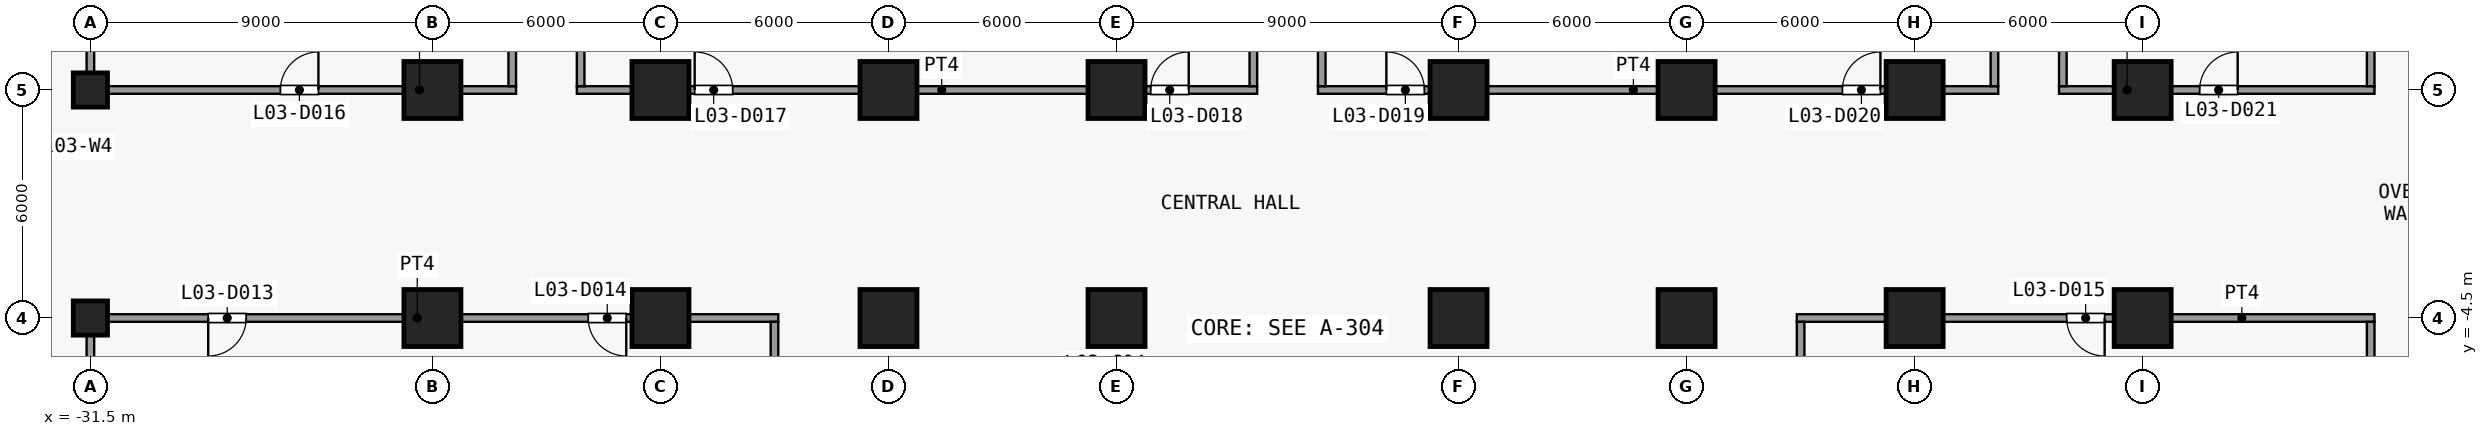
"""IFC4 building model, lengths in metres.
Left out: names, types, materials, properties, quantities, classifications, styles, units other than length and angle.
Written with IfcOpenShell. Run it as: python <this file> out.ifc"""

import sys

from ifc_helpers import new_model, si_unit, direction, frame, frame_2d, origin, origin_2d, place, context, subcontext, project, spatial, rectangle, extrude, element, fill, save


model = new_model("IFC4")
c1 = context("Model", 3, precision=1e-05, world=origin(), true_north=direction((0.0, 1.0)))
c2 = subcontext(c1, "Body", "Model", "MODEL_VIEW")
j1 = project(units=[si_unit("LENGTHUNIT", "METRE"), si_unit("PLANEANGLEUNIT", "RADIAN")], contexts=[c1])
p1 = place(None, origin())
s1 = spatial("IfcSite", under=j1, at=p1, CompositionType="ELEMENT")
p2 = place(p1, origin())
s2 = spatial("IfcBuilding", under=s1, at=p2, CompositionType="ELEMENT")
p3 = place(p2, frame((0.0, 0.0, 18.5)))
s3 = spatial("IfcBuildingStorey", under=s2, at=p3, CompositionType="ELEMENT", Elevation=18.5)
for number, where, z_axis, x_axis in (
    (1, (-31.5, -4.5, 0.0), (0.0, 0.0, 1.0), (1.0, 0.0, 0.0)),
    (2, (-31.5, 1.5, 0.0), (0.0, 0.0, 1.0), (1.0, 0.0, 0.0)),
):
    element("IfcColumn", number, at=place(p3, frame(where, z_axis=z_axis, x_axis=x_axis)), inside=s3, PredefinedType="COLUMN", context=c2, shape_type="SweptSolid", body=[
        extrude(rectangle(XDim=0.9, YDim=0.9, at=origin_2d()), origin(), (0.0, 0.0, 1.0), 5.0),
    ])
for number, where, z_axis, x_axis in (
    (3, (-22.5, -4.5, 0.0), (0.0, 0.0, 1.0), (1.0, 0.0, 0.0)),
    (4, (-22.5, 1.5, 0.0), (0.0, 0.0, 1.0), (1.0, 0.0, 0.0)),
    (5, (-16.5, -4.5, 0.0), (0.0, 0.0, 1.0), (1.0, 0.0, 0.0)),
    (6, (-16.5, 1.5, 0.0), (0.0, 0.0, 1.0), (1.0, 0.0, 0.0)),
    (7, (-10.5, -4.5, 0.0), (0.0, 0.0, 1.0), (1.0, 0.0, 0.0)),
    (8, (-10.5, 1.5, 0.0), (0.0, 0.0, 1.0), (1.0, 0.0, 0.0)),
    (9, (-4.5, -4.5, 0.0), (0.0, 0.0, 1.0), (1.0, 0.0, 0.0)),
    (10, (-4.5, 1.5, 0.0), (0.0, 0.0, 1.0), (1.0, 0.0, 0.0)),
    (11, (4.5, -4.5, 0.0), (0.0, 0.0, 1.0), (1.0, 0.0, 0.0)),
    (12, (4.5, 1.5, 0.0), (0.0, 0.0, 1.0), (1.0, 0.0, 0.0)),
    (13, (10.5, -4.5, 0.0), (0.0, 0.0, 1.0), (1.0, 0.0, 0.0)),
    (14, (10.5, 1.5, 0.0), (0.0, 0.0, 1.0), (1.0, 0.0, 0.0)),
    (15, (16.5, -4.5, 0.0), (0.0, 0.0, 1.0), (1.0, 0.0, 0.0)),
    (16, (16.5, 1.5, 0.0), (0.0, 0.0, 1.0), (1.0, 0.0, 0.0)),
    (17, (22.5, -4.5, 0.0), (0.0, 0.0, 1.0), (1.0, 0.0, 0.0)),
    (18, (22.5, 1.5, 0.0), (0.0, 0.0, 1.0), (1.0, 0.0, 0.0)),
):
    element("IfcColumn", number, at=place(p3, frame(where, z_axis=z_axis, x_axis=x_axis)), inside=s3, PredefinedType="COLUMN", context=c2, shape_type="SweptSolid", body=[
        extrude(rectangle(XDim=1.5, YDim=1.5, at=origin_2d()), origin(), (0.0, 0.0, 1.0), 5.0),
    ])
p4 = place(p3, frame((-31.6, -4.5, 0.0), z_axis=(0.0, 0.0, 1.0), x_axis=(1.0, 0.0, 0.0)))
e19 = element("IfcWall", 19, at=p4, inside=s3, PredefinedType="PARTITIONING", context=c2, shape_type="SweptSolid", body=[
    extrude(rectangle(XDim=18.2, YDim=0.2, at=frame_2d((9.1, 0.0))), origin(), (0.0, 0.0, 1.0), 4.65),
])
p5 = place(p4, frame((3.2, 0.0, 0.0)))
e20 = element("IfcOpeningElement", 20, at=p5, cuts=e19, PredefinedType="OPENING", context=c2, shape_type="SweptSolid", body=[
    extrude(rectangle(XDim=1.0, YDim=2.1, at=frame_2d((0.5, 1.05))), frame((0.0, 0.11, 0.0), z_axis=(0.0, -1.0, 0.0), x_axis=(1.0, 0.0, 0.0)), (0.0, 0.0, 1.0), 0.22),
])
p6 = place(p4, frame((13.2, 0.0, 0.0)))
e21 = element("IfcOpeningElement", 21, at=p6, cuts=e19, PredefinedType="OPENING", context=c2, shape_type="SweptSolid", body=[
    extrude(rectangle(XDim=1.0, YDim=2.1, at=frame_2d((0.5, 1.05))), frame((0.0, 0.11, 0.0), z_axis=(0.0, -1.0, 0.0), x_axis=(1.0, 0.0, 0.0)), (0.0, 0.0, 1.0), 0.22),
])
p7 = place(p3, frame((13.4, -4.5, 0.0), z_axis=(0.0, 0.0, 1.0), x_axis=(1.0, 0.0, 0.0)))
e22 = element("IfcWall", 22, at=p7, inside=s3, PredefinedType="PARTITIONING", context=c2, shape_type="SweptSolid", body=[
    extrude(rectangle(XDim=15.2, YDim=0.2, at=frame_2d((7.6, 0.0))), origin(), (0.0, 0.0, 1.0), 4.65),
])
p8 = place(p7, frame((7.1, 0.0, 0.0)))
e23 = element("IfcOpeningElement", 23, at=p8, cuts=e22, PredefinedType="OPENING", context=c2, shape_type="SweptSolid", body=[
    extrude(rectangle(XDim=1.0, YDim=2.1, at=frame_2d((0.5, 1.05))), frame((0.0, 0.11, 0.0), z_axis=(0.0, -1.0, 0.0), x_axis=(1.0, 0.0, 0.0)), (0.0, 0.0, 1.0), 0.22),
])
p9 = place(p3, frame((-31.6, 1.5, 0.0), z_axis=(0.0, 0.0, 1.0), x_axis=(1.0, 0.0, 0.0)))
e24 = element("IfcWall", 24, at=p9, inside=s3, PredefinedType="PARTITIONING", context=c2, shape_type="SweptSolid", body=[
    extrude(rectangle(XDim=11.3, YDim=0.2, at=frame_2d((5.65, 0.0))), origin(), (0.0, 0.0, 1.0), 4.65),
])
p10 = place(p9, frame((5.1, 0.0, 0.0)))
e25 = element("IfcOpeningElement", 25, at=p10, cuts=e24, PredefinedType="OPENING", context=c2, shape_type="SweptSolid", body=[
    extrude(rectangle(XDim=1.0, YDim=2.1, at=frame_2d((0.5, 1.05))), frame((0.0, 0.11, 0.0), z_axis=(0.0, -1.0, 0.0), x_axis=(1.0, 0.0, 0.0)), (0.0, 0.0, 1.0), 0.22),
])
p11 = place(p3, frame((-18.7, 1.5, 0.0), z_axis=(0.0, 0.0, 1.0), x_axis=(1.0, 0.0, 0.0)))
e26 = element("IfcWall", 26, at=p11, inside=s3, PredefinedType="PARTITIONING", context=c2, shape_type="SweptSolid", body=[
    extrude(rectangle(XDim=17.9, YDim=0.2, at=frame_2d((8.95, 0.0))), origin(), (0.0, 0.0, 1.0), 4.65),
])
p12 = place(p11, frame((3.1, 0.0, 0.0)))
e27 = element("IfcOpeningElement", 27, at=p12, cuts=e26, PredefinedType="OPENING", context=c2, shape_type="SweptSolid", body=[
    extrude(rectangle(XDim=1.0, YDim=2.1, at=frame_2d((0.5, 1.05))), frame((0.0, 0.11, 0.0), z_axis=(0.0, -1.0, 0.0), x_axis=(1.0, 0.0, 0.0)), (0.0, 0.0, 1.0), 0.22),
])
p13 = place(p11, frame((15.1, 0.0, 0.0)))
e28 = element("IfcOpeningElement", 28, at=p13, cuts=e26, PredefinedType="OPENING", context=c2, shape_type="SweptSolid", body=[
    extrude(rectangle(XDim=1.0, YDim=2.1, at=frame_2d((0.5, 1.05))), frame((0.0, 0.11, 0.0), z_axis=(0.0, -1.0, 0.0), x_axis=(1.0, 0.0, 0.0)), (0.0, 0.0, 1.0), 0.22),
])
p14 = place(p3, frame((0.8, 1.5, 0.0), z_axis=(0.0, 0.0, 1.0), x_axis=(1.0, 0.0, 0.0)))
e29 = element("IfcWall", 29, at=p14, inside=s3, PredefinedType="PARTITIONING", context=c2, shape_type="SweptSolid", body=[
    extrude(rectangle(XDim=17.9, YDim=0.2, at=frame_2d((8.95, 0.0))), origin(), (0.0, 0.0, 1.0), 4.65),
])
p15 = place(p14, frame((1.8, 0.0, 0.0)))
e30 = element("IfcOpeningElement", 30, at=p15, cuts=e29, PredefinedType="OPENING", context=c2, shape_type="SweptSolid", body=[
    extrude(rectangle(XDim=1.0, YDim=2.1, at=frame_2d((0.5, 1.05))), frame((0.0, 0.11, 0.0), z_axis=(0.0, -1.0, 0.0), x_axis=(1.0, 0.0, 0.0)), (0.0, 0.0, 1.0), 0.22),
])
p16 = place(p14, frame((13.8, 0.0, 0.0)))
e31 = element("IfcOpeningElement", 31, at=p16, cuts=e29, PredefinedType="OPENING", context=c2, shape_type="SweptSolid", body=[
    extrude(rectangle(XDim=1.0, YDim=2.1, at=frame_2d((0.5, 1.05))), frame((0.0, 0.11, 0.0), z_axis=(0.0, -1.0, 0.0), x_axis=(1.0, 0.0, 0.0)), (0.0, 0.0, 1.0), 0.22),
])
p17 = place(p3, frame((20.3, 1.5, 0.0), z_axis=(0.0, 0.0, 1.0), x_axis=(1.0, 0.0, 0.0)))
e32 = element("IfcWall", 32, at=p17, inside=s3, PredefinedType="PARTITIONING", context=c2, shape_type="SweptSolid", body=[
    extrude(rectangle(XDim=8.3, YDim=0.2, at=frame_2d((4.15, 0.0))), origin(), (0.0, 0.0, 1.0), 4.65),
])
p18 = place(p17, frame((3.7, 0.0, 0.0)))
e33 = element("IfcOpeningElement", 33, at=p18, cuts=e32, PredefinedType="OPENING", context=c2, shape_type="SweptSolid", body=[
    extrude(rectangle(XDim=1.0, YDim=2.1, at=frame_2d((0.5, 1.05))), frame((0.0, 0.11, 0.0), z_axis=(0.0, -1.0, 0.0), x_axis=(1.0, 0.0, 0.0)), (0.0, 0.0, 1.0), 0.22),
])
p19 = place(p3, frame((-31.5, -19.4, 0.0), z_axis=(0.0, 0.0, 1.0), x_axis=(0.0, 1.0, 0.0)))
e34 = element("IfcWall", 34, at=p19, inside=s3, PredefinedType="PARTITIONING", context=c2, shape_type="SweptSolid", body=[
    extrude(rectangle(XDim=14.8, YDim=0.2, at=frame_2d((7.4, 0.0))), origin(), (0.0, 0.0, 1.0), 4.65),
])
for number, where, z_axis, x_axis in (
    (35, (-31.5, 1.6, 0.0), (0.0, 0.0, 1.0), (0.0, 1.0, 0.0)),
    (36, (-20.4, 1.6, 0.0), (0.0, 0.0, 1.0), (0.0, 1.0, 0.0)),
    (37, (-18.6, 1.6, 0.0), (0.0, 0.0, 1.0), (0.0, 1.0, 0.0)),
):
    element("IfcWall", number, at=place(p3, frame(where, z_axis=z_axis, x_axis=x_axis)), inside=s3, PredefinedType="PARTITIONING", context=c2, shape_type="SweptSolid", body=[
        extrude(rectangle(XDim=11.8, YDim=0.2, at=frame_2d((5.9, 0.0))), origin(), (0.0, 0.0, 1.0), 4.65),
    ])
p20 = place(p3, frame((-13.5, -7.9, 0.0), z_axis=(0.0, 0.0, 1.0), x_axis=(0.0, 1.0, 0.0)))
e38 = element("IfcWall", 38, at=p20, inside=s3, PredefinedType="PARTITIONING", context=c2, shape_type="SweptSolid", body=[
    extrude(rectangle(XDim=3.3, YDim=0.2, at=frame_2d((1.65, 0.0))), origin(), (0.0, 0.0, 1.0), 4.65),
])
for number, where, z_axis, x_axis in (
    (39, (-0.9, 1.6, 0.0), (0.0, 0.0, 1.0), (0.0, 1.0, 0.0)),
    (40, (0.9, 1.6, 0.0), (0.0, 0.0, 1.0), (0.0, 1.0, 0.0)),
):
    element("IfcWall", number, at=place(p3, frame(where, z_axis=z_axis, x_axis=x_axis)), inside=s3, PredefinedType="PARTITIONING", context=c2, shape_type="SweptSolid", body=[
        extrude(rectangle(XDim=11.8, YDim=0.2, at=frame_2d((5.9, 0.0))), origin(), (0.0, 0.0, 1.0), 4.65),
    ])
p21 = place(p3, frame((13.5, -7.9, 0.0), z_axis=(0.0, 0.0, 1.0), x_axis=(0.0, 1.0, 0.0)))
e41 = element("IfcWall", 41, at=p21, inside=s3, PredefinedType="PARTITIONING", context=c2, shape_type="SweptSolid", body=[
    extrude(rectangle(XDim=3.3, YDim=0.2, at=frame_2d((1.65, 0.0))), origin(), (0.0, 0.0, 1.0), 4.65),
])
for number, where, z_axis, x_axis in (
    (42, (18.6, 1.6, 0.0), (0.0, 0.0, 1.0), (0.0, 1.0, 0.0)),
    (43, (20.4, 1.6, 0.0), (0.0, 0.0, 1.0), (0.0, 1.0, 0.0)),
):
    element("IfcWall", number, at=place(p3, frame(where, z_axis=z_axis, x_axis=x_axis)), inside=s3, PredefinedType="PARTITIONING", context=c2, shape_type="SweptSolid", body=[
        extrude(rectangle(XDim=11.8, YDim=0.2, at=frame_2d((5.9, 0.0))), origin(), (0.0, 0.0, 1.0), 4.65),
    ])
p22 = place(p3, frame((28.5, -19.4, 0.0), z_axis=(0.0, 0.0, 1.0), x_axis=(0.0, 1.0, 0.0)))
e44 = element("IfcWall", 44, at=p22, inside=s3, PredefinedType="PARTITIONING", context=c2, shape_type="SweptSolid", body=[
    extrude(rectangle(XDim=14.8, YDim=0.2, at=frame_2d((7.4, 0.0))), origin(), (0.0, 0.0, 1.0), 4.65),
])
p23 = place(p3, frame((28.5, 1.6, 0.0), z_axis=(0.0, 0.0, 1.0), x_axis=(0.0, 1.0, 0.0)))
e45 = element("IfcWall", 45, at=p23, inside=s3, PredefinedType="PARTITIONING", context=c2, shape_type="SweptSolid", body=[
    extrude(rectangle(XDim=11.8, YDim=0.2, at=frame_2d((5.9, 0.0))), origin(), (0.0, 0.0, 1.0), 4.65),
])
p24 = place(p5, origin())
e46 = element("IfcDoor", 46, at=p24, inside=s3, OperationType="SINGLE_SWING_LEFT", PredefinedType="DOOR", context=c2, shape_type="SweptSolid", body=[
    extrude(rectangle(XDim=1.0, YDim=2.1, at=frame_2d((0.5, 1.05))), frame((0.0, 0.025, 0.0), z_axis=(0.0, -1.0, 0.0), x_axis=(1.0, 0.0, 0.0)), (0.0, 0.0, 1.0), 0.05),
])
fill(e20, e46)
p25 = place(p6, origin())
e47 = element("IfcDoor", 47, at=p25, inside=s3, OperationType="SINGLE_SWING_RIGHT", PredefinedType="DOOR", context=c2, shape_type="SweptSolid", body=[
    extrude(rectangle(XDim=1.0, YDim=2.1, at=frame_2d((0.5, 1.05))), frame((0.0, 0.025, 0.0), z_axis=(0.0, -1.0, 0.0), x_axis=(1.0, 0.0, 0.0)), (0.0, 0.0, 1.0), 0.05),
])
fill(e21, e47)
p26 = place(p8, origin())
e48 = element("IfcDoor", 48, at=p26, inside=s3, OperationType="SINGLE_SWING_RIGHT", PredefinedType="DOOR", context=c2, shape_type="SweptSolid", body=[
    extrude(rectangle(XDim=1.0, YDim=2.1, at=frame_2d((0.5, 1.05))), frame((0.0, 0.025, 0.0), z_axis=(0.0, -1.0, 0.0), x_axis=(1.0, 0.0, 0.0)), (0.0, 0.0, 1.0), 0.05),
])
fill(e23, e48)
p27 = place(p10, origin())
e49 = element("IfcDoor", 49, at=p27, inside=s3, OperationType="SINGLE_SWING_LEFT", PredefinedType="DOOR", context=c2, shape_type="SweptSolid", body=[
    extrude(rectangle(XDim=1.0, YDim=2.1, at=frame_2d((0.5, 1.05))), frame((0.0, 0.025, 0.0), z_axis=(0.0, -1.0, 0.0), x_axis=(1.0, 0.0, 0.0)), (0.0, 0.0, 1.0), 0.05),
])
fill(e25, e49)
p28 = place(p12, origin())
e50 = element("IfcDoor", 50, at=p28, inside=s3, OperationType="SINGLE_SWING_RIGHT", PredefinedType="DOOR", context=c2, shape_type="SweptSolid", body=[
    extrude(rectangle(XDim=1.0, YDim=2.1, at=frame_2d((0.5, 1.05))), frame((0.0, 0.025, 0.0), z_axis=(0.0, -1.0, 0.0), x_axis=(1.0, 0.0, 0.0)), (0.0, 0.0, 1.0), 0.05),
])
fill(e27, e50)
p29 = place(p13, origin())
e51 = element("IfcDoor", 51, at=p29, inside=s3, OperationType="SINGLE_SWING_LEFT", PredefinedType="DOOR", context=c2, shape_type="SweptSolid", body=[
    extrude(rectangle(XDim=1.0, YDim=2.1, at=frame_2d((0.5, 1.05))), frame((0.0, 0.025, 0.0), z_axis=(0.0, -1.0, 0.0), x_axis=(1.0, 0.0, 0.0)), (0.0, 0.0, 1.0), 0.05),
])
fill(e28, e51)
p30 = place(p15, origin())
e52 = element("IfcDoor", 52, at=p30, inside=s3, OperationType="SINGLE_SWING_RIGHT", PredefinedType="DOOR", context=c2, shape_type="SweptSolid", body=[
    extrude(rectangle(XDim=1.0, YDim=2.1, at=frame_2d((0.5, 1.05))), frame((0.0, 0.025, 0.0), z_axis=(0.0, -1.0, 0.0), x_axis=(1.0, 0.0, 0.0)), (0.0, 0.0, 1.0), 0.05),
])
fill(e30, e52)
p31 = place(p16, origin())
e53 = element("IfcDoor", 53, at=p31, inside=s3, OperationType="SINGLE_SWING_LEFT", PredefinedType="DOOR", context=c2, shape_type="SweptSolid", body=[
    extrude(rectangle(XDim=1.0, YDim=2.1, at=frame_2d((0.5, 1.05))), frame((0.0, 0.025, 0.0), z_axis=(0.0, -1.0, 0.0), x_axis=(1.0, 0.0, 0.0)), (0.0, 0.0, 1.0), 0.05),
])
fill(e31, e53)
p32 = place(p18, origin())
e54 = element("IfcDoor", 54, at=p32, inside=s3, OperationType="SINGLE_SWING_LEFT", PredefinedType="DOOR", context=c2, shape_type="SweptSolid", body=[
    extrude(rectangle(XDim=1.0, YDim=2.1, at=frame_2d((0.5, 1.05))), frame((0.0, 0.025, 0.0), z_axis=(0.0, -1.0, 0.0), x_axis=(1.0, 0.0, 0.0)), (0.0, 0.0, 1.0), 0.05),
])
fill(e33, e54)
save(model, sys.argv[1])
